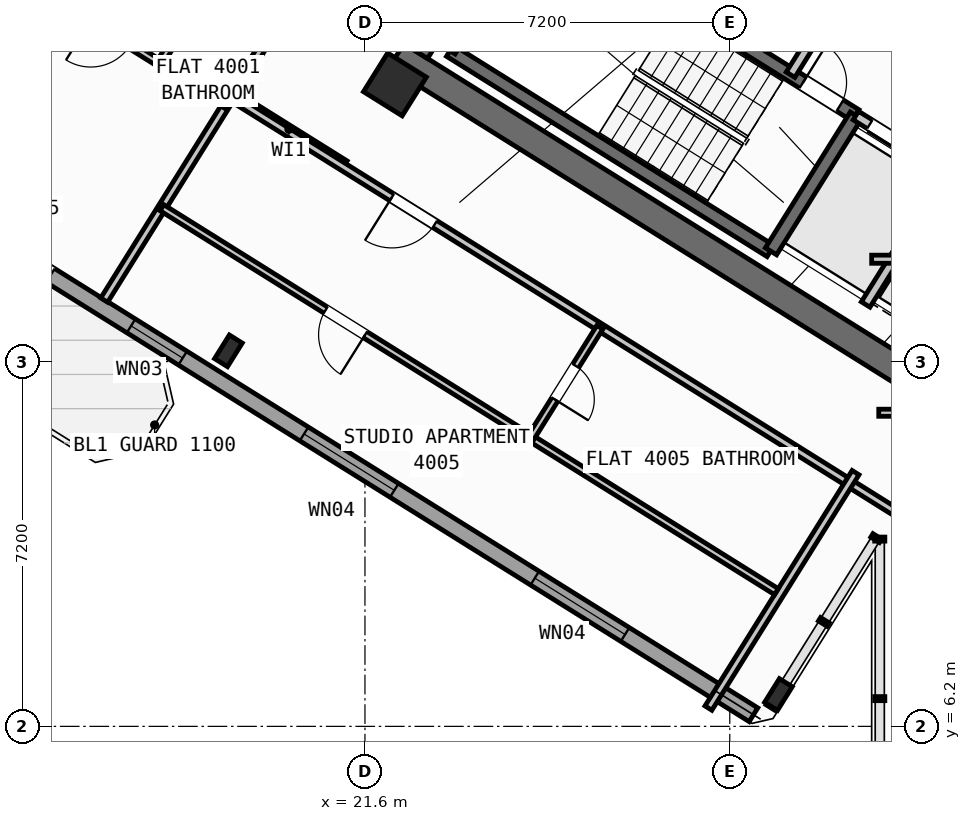
"""IFC4 building model, lengths in metres.
Left out: names, types, materials, properties, quantities, classifications, styles, units other than length and angle.
Written with IfcOpenShell. Run it as: python <this file> out.ifc"""

import sys

from ifc_helpers import new_model, si_unit, direction, frame, frame_2d, origin, origin_2d, place, context, subcontext, project, spatial, rectangle, hollow_rectangle, i_section, extrude, source, transform, mapped, element, fill, save


model = new_model("IFC4")
c1 = context("Model", 3, precision=1e-05, world=origin(), true_north=direction((0.0, 1.0)))
c2 = subcontext(c1, "Body", "Model", "MODEL_VIEW")
j1 = project(units=[si_unit("LENGTHUNIT", "METRE"), si_unit("PLANEANGLEUNIT", "RADIAN")], contexts=[c1])
p1 = place(None, origin())
s1 = spatial("IfcSite", under=j1, at=p1, CompositionType="ELEMENT")
p2 = place(p1, origin())
s2 = spatial("IfcBuilding", under=s1, at=p2, CompositionType="ELEMENT")
p3 = place(p2, frame((0.0, 0.0, 158.7)))
s3 = spatial("IfcBuildingStorey", under=s2, at=p3, CompositionType="ELEMENT", Elevation=158.7)
p4 = place(p3, frame((33.366, 12.477, 0.0), z_axis=(0.0, 0.0, 1.0), x_axis=(-0.848047359947, 0.529920442413, 0.0)))
e1 = element("IfcWall", 1, at=p4, inside=s3, PredefinedType="SHEAR", context=c2, shape_type="SweptSolid", body=[
    extrude(rectangle(XDim=13.14, YDim=0.55, at=frame_2d((6.57, 0.0))), origin(), (0.0, 0.0, 1.0), 3.35),
])
p5 = place(p3, frame((26.007, 24.976, 0.0), z_axis=(0.0, 0.0, 1.0), x_axis=(-0.529923795287, -0.848045264823, 0.0)))
e2 = element("IfcWall", 2, at=p5, inside=s3, PredefinedType="SHEAR", context=c2, shape_type="SweptSolid", body=[
    extrude(rectangle(XDim=6.425, YDim=0.55, at=frame_2d((3.212, 0.0))), origin(), (0.0, 0.0, 1.0), 3.35),
])
m1 = source(origin(), c2, "Body", "SweptSolid", [
    extrude(i_section(OverallWidth=0.3, OverallDepth=0.55, WebThickness=0.015, FlangeThickness=0.029, at=origin_2d()), origin(), (0.0, 0.0, 1.0), 3.6),
])
p6 = place(p3, frame((29.761, 6.829, 0.0), z_axis=(0.0, 0.0, 1.0), x_axis=(-0.848048096156, 0.529919264233, 0.0)))
e3 = element("IfcColumn", 3, at=p6, inside=s3, PredefinedType="COLUMN", context=c2, shape_type="MappedRepresentation", body=[
    mapped(m1, transform((0.0, 0.0, 0.0), scale=1.0)),
])
m2 = source(origin(), c2, "Body", "SweptSolid", [
    extrude(hollow_rectangle(XDim=0.9, YDim=0.9, WallThickness=0.036, at=origin_2d()), origin(), (0.0, 0.0, 1.0), 3.6),
])
p7 = place(p3, frame((22.191, 18.87, 0.0), z_axis=(0.0, 0.0, 1.0), x_axis=(-0.848048096156, 0.529919264233, 0.0)))
e4 = element("IfcColumn", 4, at=p7, inside=s3, PredefinedType="COLUMN", context=c2, shape_type="MappedRepresentation", body=[
    mapped(m2, transform((0.0, 0.0, 0.0), scale=1.0)),
])
p8 = place(p3, frame((18.906, 13.612, 0.0), z_axis=(0.0, 0.0, 1.0), x_axis=(-0.848048096156, 0.529919264233, 0.0)))
e5 = element("IfcColumn", 5, at=p8, inside=s3, PredefinedType="COLUMN", context=c2, shape_type="MappedRepresentation", body=[
    mapped(m1, transform((0.0, 0.0, 0.0), scale=1.0)),
])
p9 = place(p3, frame((29.268, 6.429, 0.0), z_axis=(0.0, 0.0, 1.0), x_axis=(-0.848049971435, 0.529916263149, 0.0)))
e6 = element("IfcWall", 6, at=p9, inside=s3, PredefinedType="STANDARD", context=c2, shape_type="SweptSolid", body=[
    extrude(rectangle(XDim=31.588, YDim=0.32, at=frame_2d((15.794, 0.0))), origin(), (0.0, 0.0, 1.0), 3.35),
])
p10 = place(p9, frame((16.362, 0.0, 0.0)))
e7 = element("IfcOpeningElement", 7, at=p10, cuts=e6, PredefinedType="OPENING", context=c2, shape_type="SweptSolid", body=[
    extrude(rectangle(XDim=1.2, YDim=2.15, at=frame_2d((0.6, 1.075))), frame((0.0, 0.17, 0.0), z_axis=(0.0, -1.0, 0.0), x_axis=(1.0, 0.0, 0.0)), (0.0, 0.0, 1.0), 0.34),
])
p11 = place(p9, frame((2.989, 0.0, 0.8)))
e8 = element("IfcOpeningElement", 8, at=p11, cuts=e6, PredefinedType="OPENING", context=c2, shape_type="SweptSolid", body=[
    extrude(rectangle(XDim=2.1, YDim=1.55, at=frame_2d((1.05, 0.775))), frame((0.0, 0.17, 0.0), z_axis=(0.0, -1.0, 0.0), x_axis=(1.0, 0.0, 0.0)), (0.0, 0.0, 1.0), 0.34),
])
p12 = place(p9, frame((8.359, 0.0, 0.8)))
e9 = element("IfcOpeningElement", 9, at=p12, cuts=e6, PredefinedType="OPENING", context=c2, shape_type="SweptSolid", body=[
    extrude(rectangle(XDim=2.1, YDim=1.55, at=frame_2d((1.05, 0.775))), frame((0.0, 0.17, 0.0), z_axis=(0.0, -1.0, 0.0), x_axis=(1.0, 0.0, 0.0)), (0.0, 0.0, 1.0), 0.34),
])
p13 = place(p9, frame((13.284, 0.0, 0.95)))
e10 = element("IfcOpeningElement", 10, at=p13, cuts=e6, PredefinedType="OPENING", context=c2, shape_type="SweptSolid", body=[
    extrude(rectangle(XDim=1.2, YDim=1.4, at=frame_2d((0.6, 0.7))), frame((0.0, 0.17, 0.0), z_axis=(0.0, -1.0, 0.0), x_axis=(1.0, 0.0, 0.0)), (0.0, 0.0, 1.0), 0.34),
])
p14 = place(p9, frame((20.259, 0.0, 0.95)))
e11 = element("IfcOpeningElement", 11, at=p14, cuts=e6, PredefinedType="OPENING", context=c2, shape_type="SweptSolid", body=[
    extrude(rectangle(XDim=1.2, YDim=1.4, at=frame_2d((0.6, 0.7))), frame((0.0, 0.17, 0.0), z_axis=(0.0, -1.0, 0.0), x_axis=(1.0, 0.0, 0.0)), (0.0, 0.0, 1.0), 0.34),
])
p15 = place(p9, frame((22.929, 0.0, 0.95)))
e12 = element("IfcOpeningElement", 12, at=p15, cuts=e6, PredefinedType="OPENING", context=c2, shape_type="SweptSolid", body=[
    extrude(rectangle(XDim=1.2, YDim=1.4, at=frame_2d((0.6, 0.7))), frame((0.0, 0.17, 0.0), z_axis=(0.0, -1.0, 0.0), x_axis=(1.0, 0.0, 0.0)), (0.0, 0.0, 1.0), 0.34),
])
p16 = place(p9, frame((27.481, 0.0, 0.8)))
e13 = element("IfcOpeningElement", 13, at=p16, cuts=e6, PredefinedType="OPENING", context=c2, shape_type="SweptSolid", body=[
    extrude(rectangle(XDim=2.1, YDim=1.55, at=frame_2d((1.05, 0.775))), frame((0.0, 0.17, 0.0), z_axis=(0.0, -1.0, 0.0), x_axis=(1.0, 0.0, 0.0)), (0.0, 0.0, 1.0), 0.34),
])
p17 = place(p3, frame((29.605, 15.581, 0.0), z_axis=(0.0, 0.0, 1.0), x_axis=(-0.848036911448, 0.529937163087, 0.0)))
e14 = element("IfcWall", 14, at=p17, inside=s3, PredefinedType="SHEAR", context=c2, shape_type="SweptSolid", body=[
    extrude(rectangle(XDim=7.46, YDim=0.26, at=frame_2d((3.73, 0.0))), origin(), (0.0, 0.0, 1.0), 3.35),
])
p18 = place(p3, frame((31.28, 18.261, 0.0), z_axis=(0.0, 0.0, 1.0), x_axis=(-0.848051618787, 0.529913626805, 0.0)))
e15 = element("IfcWall", 15, at=p18, inside=s3, PredefinedType="SHEAR", context=c2, shape_type="SweptSolid", body=[
    extrude(rectangle(XDim=7.46, YDim=0.26, at=frame_2d((3.73, 0.0))), origin(), (0.0, 0.0, 1.0), 3.35),
])
p19 = place(p18, frame((0.36, 0.0, 0.0)))
e16 = element("IfcOpeningElement", 16, at=p19, cuts=e15, PredefinedType="OPENING", context=c2, shape_type="SweptSolid", body=[
    extrude(rectangle(XDim=0.86, YDim=2.05, at=frame_2d((0.43, 1.025))), frame((0.0, 0.14, 0.0), z_axis=(0.0, -1.0, 0.0), x_axis=(1.0, 0.0, 0.0)), (0.0, 0.0, 1.0), 0.28),
])
p20 = place(p3, frame((31.288, 18.256, 0.0), z_axis=(0.0, 0.0, 1.0), x_axis=(-0.529943379326, -0.848033026897, 0.0)))
e17 = element("IfcWall", 17, at=p20, inside=s3, PredefinedType="SHEAR", context=c2, shape_type="SweptSolid", body=[
    extrude(rectangle(XDim=3.16, YDim=0.26, at=frame_2d((1.58, 0.0))), origin(), (0.0, 0.0, 1.0), 3.35),
])
p21 = place(p3, frame((24.945, 22.22, 0.0), z_axis=(0.0, 0.0, 1.0), x_axis=(-0.529908658664, -0.84805472316, 0.0)))
e18 = element("IfcWall", 18, at=p21, inside=s3, PredefinedType="SHEAR", context=c2, shape_type="SweptSolid", body=[
    extrude(rectangle(XDim=3.16, YDim=0.26, at=frame_2d((1.58, 0.0))), origin(), (0.0, 0.0, 1.0), 3.35),
])
p22 = place(p3, frame((34.891, 16.005, 0.0), z_axis=(0.0, 0.0, 1.0), x_axis=(-0.848062873452, 0.529895614884, 0.0)))
e19 = element("IfcWall", 19, at=p22, inside=s3, PredefinedType="STANDARD", context=c2, shape_type="SweptSolid", body=[
    extrude(rectangle(XDim=4.248, YDim=0.2, at=frame_2d((2.124, 0.0))), origin(), (0.0, 0.0, 1.0), 3.34),
])
p23 = place(p22, frame((0.398, 0.0, 0.0)))
e20 = element("IfcOpeningElement", 20, at=p23, cuts=e19, PredefinedType="OPENING", context=c2, shape_type="SweptSolid", body=[
    extrude(rectangle(XDim=1.3, YDim=2.2, at=frame_2d((0.65, 1.1))), frame((0.0, 0.11, 0.0), z_axis=(0.0, -1.0, 0.0), x_axis=(1.0, 0.0, 0.0)), (0.0, 0.0, 1.0), 0.22),
])
p24 = place(p22, frame((2.473, 0.0, 0.0)))
e21 = element("IfcOpeningElement", 21, at=p24, cuts=e19, PredefinedType="OPENING", context=c2, shape_type="SweptSolid", body=[
    extrude(rectangle(XDim=1.45, YDim=2.25, at=frame_2d((0.725, 1.125))), frame((0.0, 0.11, 0.0), z_axis=(0.0, -1.0, 0.0), x_axis=(1.0, 0.0, 0.0)), (0.0, 0.0, 1.0), 0.22),
])
p25 = place(p3, frame((36.417, 18.447, 0.0), z_axis=(0.0, 0.0, 1.0), x_axis=(-0.848064879198, 0.529892404805, 0.0)))
e22 = element("IfcWall", 22, at=p25, inside=s3, PredefinedType="STANDARD", context=c2, shape_type="SweptSolid", body=[
    extrude(rectangle(XDim=5.768, YDim=0.2, at=frame_2d((2.884, 0.0))), origin(), (0.0, 0.0, 1.0), 3.34),
])
p26 = place(p25, frame((2.548, 0.0, 0.0)))
e23 = element("IfcOpeningElement", 23, at=p26, cuts=e22, PredefinedType="OPENING", context=c2, shape_type="SweptSolid", body=[
    extrude(rectangle(XDim=1.15, YDim=2.1, at=frame_2d((0.575, 1.05))), frame((0.0, 0.11, 0.0), z_axis=(0.0, -1.0, 0.0), x_axis=(1.0, 0.0, 0.0)), (0.0, 0.0, 1.0), 0.22),
])
p27 = place(p3, frame((33.029, 17.003, 0.0), z_axis=(0.0, 0.0, 1.0), x_axis=(-0.529916267533, -0.848049968695, 0.0)))
e24 = element("IfcWall", 24, at=p27, inside=s3, PredefinedType="STANDARD", context=c2, shape_type="SweptSolid", body=[
    extrude(rectangle(XDim=2.92, YDim=0.2, at=frame_2d((1.46, 0.0))), origin(), (0.0, 0.0, 1.0), 3.34),
])
p28 = place(p3, frame((31.525, 21.504, 0.0), z_axis=(0.0, 0.0, 1.0), x_axis=(-0.529907497854, -0.848055448493, 0.0)))
e25 = element("IfcWall", 25, at=p28, inside=s3, PredefinedType="STANDARD", context=c2, shape_type="SweptSolid", body=[
    extrude(rectangle(XDim=2.88, YDim=0.2, at=frame_2d((1.44, 0.0))), origin(), (0.0, 0.0, 1.0), 3.34),
])
p29 = place(p3, frame((21.206, 17.292, 0.0), z_axis=(0.0, 0.0, 1.0), x_axis=(-0.848050851465, 0.529914854792, 0.0)))
e26 = element("IfcWall", 26, at=p29, inside=s3, PredefinedType="PARTITIONING", context=c2, shape_type="SweptSolid", body=[
    extrude(rectangle(XDim=2.61, YDim=0.16, at=frame_2d((1.305, 0.0))), origin(), (0.0, 0.0, 1.0), 3.34),
])
p30 = place(p3, frame((20.719, 21.44, 0.0), z_axis=(0.0, 0.0, 1.0), x_axis=(-0.529906246318, -0.848056230514, 0.0)))
e27 = element("IfcWall", 27, at=p30, inside=s3, PredefinedType="PARTITIONING", context=c2, shape_type="SweptSolid", body=[
    extrude(rectangle(XDim=8.05, YDim=0.16, at=frame_2d((4.025, 0.0))), origin(), (0.0, 0.0, 1.0), 3.34),
])
p31 = place(p3, frame((16.519, 21.87, 0.0), z_axis=(0.0, 0.0, 1.0), x_axis=(-0.529922447305, -0.848046107144, 0.0)))
e28 = element("IfcWall", 28, at=p31, inside=s3, PredefinedType="PARTITIONING", context=c2, shape_type="SweptSolid", body=[
    extrude(rectangle(XDim=5.451, YDim=0.16, at=frame_2d((2.726, 0.0))), origin(), (0.0, 0.0, 1.0), 2.775),
])
p32 = place(p3, frame((18.86, 18.464, 0.0), z_axis=(0.0, 0.0, 1.0), x_axis=(-0.848059820872, 0.529900500304, 0.0)))
e29 = element("IfcWall", 29, at=p32, inside=s3, PredefinedType="PLUMBINGWALL", context=c2, shape_type="SweptSolid", body=[
    extrude(rectangle(XDim=3.79, YDim=0.14, at=frame_2d((1.895, 0.0))), origin(), (0.0, 0.0, 1.0), 3.34),
])
p33 = place(p32, frame((2.23, 0.0, 0.0)))
e30 = element("IfcOpeningElement", 30, at=p33, cuts=e29, PredefinedType="OPENING", context=c2, shape_type="SweptSolid", body=[
    extrude(rectangle(XDim=0.92, YDim=2.08, at=frame_2d((0.46, 1.04))), frame((0.0, 0.08, 0.0), z_axis=(0.0, -1.0, 0.0), x_axis=(1.0, 0.0, 0.0)), (0.0, 0.0, 1.0), 0.16),
])
p34 = place(p3, frame((19.405, 22.261, 0.0), z_axis=(0.0, 0.0, 1.0), x_axis=(-0.529898896701, -0.848060822863, 0.0)))
e31 = element("IfcWall", 31, at=p34, inside=s3, PredefinedType="PLUMBINGWALL", context=c2, shape_type="SweptSolid", body=[
    extrude(rectangle(XDim=3.51, YDim=0.14, at=frame_2d((1.755, 0.0))), origin(), (0.0, 0.0, 1.0), 2.995),
])
p35 = place(p34, frame((1.365, 0.0, 0.0)))
e32 = element("IfcOpeningElement", 32, at=p35, cuts=e31, PredefinedType="OPENING", context=c2, shape_type="SweptSolid", body=[
    extrude(rectangle(XDim=0.78, YDim=2.05, at=frame_2d((0.39, 1.025))), frame((0.0, 0.08, 0.0), z_axis=(0.0, -1.0, 0.0), x_axis=(1.0, 0.0, 0.0)), (0.0, 0.0, 1.0), 0.16),
])
p36 = place(p3, frame((32.164, 10.374, 0.0), z_axis=(0.0, 0.0, 1.0), x_axis=(-0.848044107957, 0.529925646633, 0.0)))
e33 = element("IfcWall", 33, at=p36, inside=s3, PredefinedType="PARTITIONING", context=c2, shape_type="SweptSolid", body=[
    extrude(rectangle(XDim=15.57, YDim=0.16, at=frame_2d((7.785, 0.0))), origin(), (0.0, 0.0, 1.0), 3.34),
])
p37 = place(p36, frame((10.83, 0.0, 0.0)))
e34 = element("IfcOpeningElement", 34, at=p37, cuts=e33, PredefinedType="OPENING", context=c2, shape_type="SweptSolid", body=[
    extrude(rectangle(XDim=1.0, YDim=2.1, at=frame_2d((0.5, 1.05))), frame((0.0, 0.09, 0.0), z_axis=(0.0, -1.0, 0.0), x_axis=(1.0, 0.0, 0.0)), (0.0, 0.0, 1.0), 0.18),
])
p38 = place(p3, frame((31.282, 11.208, 0.0), z_axis=(0.0, 0.0, 1.0), x_axis=(-0.529938869374, -0.84803584519, 0.0)))
e35 = element("IfcWall", 35, at=p38, inside=s3, PredefinedType="PARTITIONING", context=c2, shape_type="SweptSolid", body=[
    extrude(rectangle(XDim=5.48, YDim=0.16, at=frame_2d((2.74, 0.0))), origin(), (0.0, 0.0, 1.0), 3.34),
])
p39 = place(p3, frame((29.72, 8.859, 0.0), z_axis=(0.0, 0.0, 1.0), x_axis=(-0.848049134363, 0.529917602752, 0.0)))
e36 = element("IfcWall", 36, at=p39, inside=s3, PredefinedType="PLUMBINGWALL", context=c2, shape_type="SweptSolid", body=[
    extrude(rectangle(XDim=14.3, YDim=0.14, at=frame_2d((7.15, 0.0))), origin(), (0.0, 0.0, 1.0), 3.34),
])
p40 = place(p39, frame((9.57, 0.0, 0.0)))
e37 = element("IfcOpeningElement", 37, at=p40, cuts=e36, PredefinedType="OPENING", context=c2, shape_type="SweptSolid", body=[
    extrude(rectangle(XDim=0.92, YDim=2.08, at=frame_2d((0.46, 1.04))), frame((0.0, 0.08, 0.0), z_axis=(0.0, -1.0, 0.0), x_axis=(1.0, 0.0, 0.0)), (0.0, 0.0, 1.0), 0.16),
])
p41 = place(p3, frame((26.237, 14.078, 0.0), z_axis=(0.0, 0.0, 1.0), x_axis=(-0.52995640672, -0.848024885824, 0.0)))
e38 = element("IfcWall", 38, at=p41, inside=s3, PredefinedType="PLUMBINGWALL", context=c2, shape_type="SweptSolid", body=[
    extrude(rectangle(XDim=2.58, YDim=0.14, at=frame_2d((1.29, 0.0))), origin(), (0.0, 0.0, 1.0), 3.34),
])
p42 = place(p41, frame((0.9, 0.0, 0.0)))
e39 = element("IfcOpeningElement", 39, at=p42, cuts=e38, PredefinedType="OPENING", context=c2, shape_type="SweptSolid", body=[
    extrude(rectangle(XDim=0.78, YDim=2.05, at=frame_2d((0.39, 1.025))), frame((0.0, 0.08, 0.0), z_axis=(0.0, -1.0, 0.0), x_axis=(1.0, 0.0, 0.0)), (0.0, 0.0, 1.0), 0.16),
])
p43 = place(p3, frame((31.6, 15.42, 0.0), z_axis=(0.0, 0.0, 1.0), x_axis=(1.0, 0.0, 0.0)))
e40 = element("IfcWall", 40, at=p43, inside=s3, PredefinedType="PARTITIONING", context=c2, shape_type="SweptSolid", body=[
    extrude(rectangle(XDim=2.925, YDim=0.16, at=frame_2d((1.462, 0.0))), origin(), (0.0, 0.0, 1.0), 3.34),
])
p44 = place(p3, frame((31.74, 12.39, 0.0), z_axis=(0.0, 0.0, 1.0), x_axis=(1.0, 0.0, 0.0)))
e41 = element("IfcWall", 41, at=p44, inside=s3, PredefinedType="PLUMBINGWALL", context=c2, shape_type="SweptSolid", body=[
    extrude(rectangle(XDim=0.951, YDim=0.14, at=frame_2d((0.475, 0.0))), origin(), (0.0, 0.0, 1.0), 3.34),
])
m3 = source(origin(), c2, "Body", "SweptSolid", [
    extrude(rectangle(XDim=2.1, YDim=1.55, at=frame_2d((1.05, 0.775))), frame((0.0, 0.03, 0.0), z_axis=(0.0, -1.0, 0.0), x_axis=(1.0, 0.0, 0.0)), (0.0, 0.0, 1.0), 0.06),
])
p45 = place(p11, origin())
e42 = element("IfcWindow", 42, at=p45, inside=s3, PartitioningType="SINGLE_PANEL", PredefinedType="WINDOW", context=c2, shape_type="MappedRepresentation", body=[
    mapped(m3, transform((0.0, 0.0, 0.0), scale=1.0)),
])
fill(e8, e42)
p46 = place(p12, origin())
e43 = element("IfcWindow", 43, at=p46, inside=s3, PartitioningType="SINGLE_PANEL", PredefinedType="WINDOW", context=c2, shape_type="MappedRepresentation", body=[
    mapped(m3, transform((0.0, 0.0, 0.0), scale=1.0)),
])
fill(e9, e43)
m4 = source(origin(), c2, "Body", "SweptSolid", [
    extrude(rectangle(XDim=1.2, YDim=1.4, at=frame_2d((0.6, 0.7))), frame((0.0, 0.03, 0.0), z_axis=(0.0, -1.0, 0.0), x_axis=(1.0, 0.0, 0.0)), (0.0, 0.0, 1.0), 0.06),
])
p47 = place(p13, origin())
e44 = element("IfcWindow", 44, at=p47, inside=s3, PartitioningType="SINGLE_PANEL", PredefinedType="WINDOW", context=c2, shape_type="MappedRepresentation", body=[
    mapped(m4, transform((0.0, 0.0, 0.0), scale=1.0)),
])
fill(e10, e44)
m5 = source(origin(), c2, "Body", "SweptSolid", [
    extrude(rectangle(XDim=0.86, YDim=2.05, at=frame_2d((0.43, 1.025))), frame((0.0, 0.025, 0.0), z_axis=(0.0, -1.0, 0.0), x_axis=(1.0, 0.0, 0.0)), (0.0, 0.0, 1.0), 0.05),
])
p48 = place(p19, frame((0.86, 0.0, 0.0), z_axis=(0.0, 0.0, 1.0), x_axis=(-1.0, 0.0, 0.0)))
e45 = element("IfcDoor", 45, at=p48, inside=s3, OperationType="SINGLE_SWING_LEFT", PredefinedType="DOOR", context=c2, shape_type="MappedRepresentation", body=[
    mapped(m5, transform((0.0, 0.0, 0.0), scale=1.0)),
])
fill(e16, e45)
m6 = source(origin(), c2, "Body", "SweptSolid", [
    extrude(rectangle(XDim=1.45, YDim=2.25, at=frame_2d((0.725, 1.125))), frame((0.0, 0.025, 0.0), z_axis=(0.0, -1.0, 0.0), x_axis=(1.0, 0.0, 0.0)), (0.0, 0.0, 1.0), 0.05),
])
p49 = place(p24, origin())
e46 = element("IfcDoor", 46, at=p49, inside=s3, OperationType="DOUBLE_DOOR_SLIDING", PredefinedType="DOOR", context=c2, shape_type="MappedRepresentation", body=[
    mapped(m6, transform((0.0, 0.0, 0.0), scale=1.0)),
])
fill(e21, e46)
m7 = source(origin(), c2, "Body", "SweptSolid", [
    extrude(rectangle(XDim=1.0, YDim=2.1, at=frame_2d((0.5, 1.05))), frame((0.0, 0.025, 0.0), z_axis=(0.0, -1.0, 0.0), x_axis=(1.0, 0.0, 0.0)), (0.0, 0.0, 1.0), 0.05),
])
p50 = place(p37, origin())
e47 = element("IfcDoor", 47, at=p50, inside=s3, OperationType="SINGLE_SWING_RIGHT", PredefinedType="DOOR", context=c2, shape_type="MappedRepresentation", body=[
    mapped(m7, transform((0.0, 0.0, 0.0), scale=1.0)),
])
fill(e34, e47)
m8 = source(origin(), c2, "Body", "SweptSolid", [
    extrude(rectangle(XDim=0.92, YDim=2.08, at=frame_2d((0.46, 1.04))), frame((0.0, 0.025, 0.0), z_axis=(0.0, -1.0, 0.0), x_axis=(1.0, 0.0, 0.0)), (0.0, 0.0, 1.0), 0.05),
])
p51 = place(p40, origin())
e48 = element("IfcDoor", 48, at=p51, inside=s3, OperationType="SINGLE_SWING_LEFT", PredefinedType="DOOR", context=c2, shape_type="MappedRepresentation", body=[
    mapped(m8, transform((0.0, 0.0, 0.0), scale=1.0)),
])
fill(e37, e48)
m9 = source(origin(), c2, "Body", "SweptSolid", [
    extrude(rectangle(XDim=0.78, YDim=2.05, at=frame_2d((0.39, 1.025))), frame((0.0, 0.025, 0.0), z_axis=(0.0, -1.0, 0.0), x_axis=(1.0, 0.0, 0.0)), (0.0, 0.0, 1.0), 0.05),
])
p52 = place(p42, origin())
e49 = element("IfcDoor", 49, at=p52, inside=s3, OperationType="SINGLE_SWING_RIGHT", PredefinedType="DOOR", context=c2, shape_type="MappedRepresentation", body=[
    mapped(m9, transform((0.0, 0.0, 0.0), scale=1.0)),
])
fill(e39, e49)
save(model, sys.argv[1])
